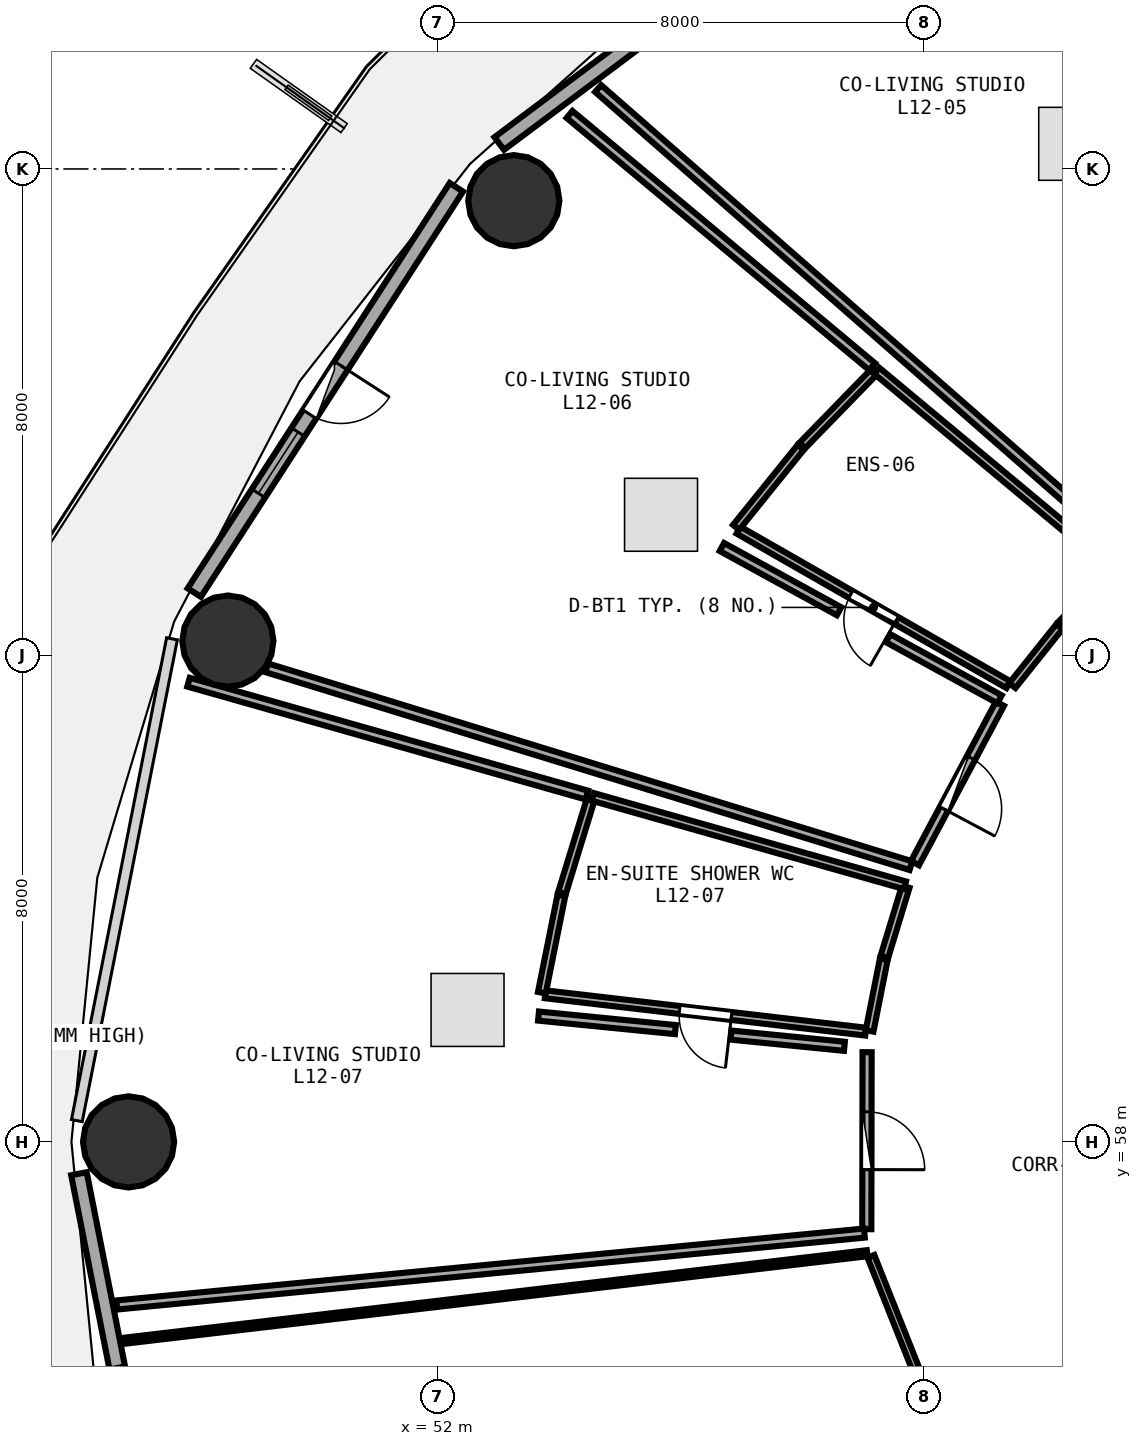
"""IFC4 building model, lengths in metres.
Left out: names, types, materials, properties, quantities, classifications, styles, units other than length and angle.
Written with IfcOpenShell. Run it as: python <this file> out.ifc"""

import sys

from ifc_helpers import new_model, si_unit, direction, frame, frame_2d, origin, origin_2d, place, context, subcontext, project, spatial, rectangle, circle, extrude, element, fill, save


model = new_model("IFC4")
c1 = context("Model", 3, precision=1e-05, world=origin(), true_north=direction((0.0, 1.0)))
c2 = subcontext(c1, "Body", "Model", "MODEL_VIEW")
j1 = project(units=[si_unit("LENGTHUNIT", "METRE"), si_unit("PLANEANGLEUNIT", "RADIAN")], contexts=[c1])
p1 = place(None, origin())
s1 = spatial("IfcSite", under=j1, at=p1, CompositionType="ELEMENT")
p2 = place(p1, origin())
s2 = spatial("IfcBuilding", under=s1, at=p2, CompositionType="ELEMENT")
p3 = place(p2, frame((0.0, 0.0, 48.75)))
s3 = spatial("IfcBuildingStorey", under=s2, at=p3, CompositionType="ELEMENT", Elevation=48.75)
for number, where, z_axis, x_axis in (
    (1, (53.256, 73.478, 0.0), (0.0, 0.0, 1.0), (1.0, 0.0, 0.0)),
    (2, (48.553, 66.236, 0.0), (0.0, 0.0, 1.0), (1.0, 0.0, 0.0)),
    (3, (46.92, 58.0, 0.0), (0.0, 0.0, 1.0), (1.0, 0.0, 0.0)),
):
    element("IfcColumn", number, at=place(p3, frame(where, z_axis=z_axis, x_axis=x_axis)), inside=s3, PredefinedType="COLUMN", context=c2, shape_type="SweptSolid", body=[
        extrude(circle(Radius=0.75, at=origin_2d()), origin(), (0.0, 0.0, 1.0), 3.75),
    ])
p4 = place(p3, frame((59.651, 79.389, 0.0), z_axis=(0.0, 0.0, 1.0), x_axis=(-0.80030733173, -0.599590005569, 0.0)))
e4 = element("IfcWall", 4, at=p4, inside=s3, PredefinedType="SOLIDWALL", context=c2, shape_type="SweptSolid", body=[
    extrude(rectangle(XDim=8.291, YDim=0.26, at=frame_2d((4.145, 0.0))), origin(), (0.0, 0.0, 1.0), 3.475),
])
p5 = place(p4, frame((3.345, 0.0, 0.85)))
e5 = element("IfcOpeningElement", 5, at=p5, cuts=e4, PredefinedType="OPENING", context=c2, shape_type="SweptSolid", body=[
    extrude(rectangle(XDim=1.6, YDim=1.45, at=frame_2d((0.8, 0.725))), frame((0.0, 0.14, 0.0), z_axis=(0.0, -1.0, 0.0), x_axis=(1.0, 0.0, 0.0)), (0.0, 0.0, 1.0), 0.28),
])
p6 = place(p3, frame((52.311, 73.698, 0.0), z_axis=(0.0, 0.0, 1.0), x_axis=(-0.543005114258, -0.839729388488, 0.0)))
e6 = element("IfcWall", 6, at=p6, inside=s3, PredefinedType="SOLIDWALL", context=c2, shape_type="SweptSolid", body=[
    extrude(rectangle(XDim=7.938, YDim=0.26, at=frame_2d((3.969, 0.0))), origin(), (0.0, 0.0, 1.0), 3.475),
])
p7 = place(p6, frame((3.494, 0.0, 0.0)))
e7 = element("IfcOpeningElement", 7, at=p7, cuts=e6, PredefinedType="OPENING", context=c2, shape_type="SweptSolid", body=[
    extrude(rectangle(XDim=0.95, YDim=2.1, at=frame_2d((0.475, 1.05))), frame((0.0, 0.14, 0.0), z_axis=(0.0, -1.0, 0.0), x_axis=(1.0, 0.0, 0.0)), (0.0, 0.0, 1.0), 0.28),
])
p8 = place(p6, frame((4.794, 0.0, 0.85)))
e8 = element("IfcOpeningElement", 8, at=p8, cuts=e6, PredefinedType="OPENING", context=c2, shape_type="SweptSolid", body=[
    extrude(rectangle(XDim=1.2, YDim=1.45, at=frame_2d((0.6, 0.725))), frame((0.0, 0.14, 0.0), z_axis=(0.0, -1.0, 0.0), x_axis=(1.0, 0.0, 0.0)), (0.0, 0.0, 1.0), 0.28),
])
p9 = place(p3, frame((46.104, 57.477, 0.0), z_axis=(0.0, 0.0, 1.0), x_axis=(0.193726159581, -0.98105564322, 0.0)))
e9 = element("IfcWall", 9, at=p9, inside=s3, PredefinedType="SOLIDWALL", context=c2, shape_type="SweptSolid", body=[
    extrude(rectangle(XDim=7.703, YDim=0.26, at=frame_2d((3.851, 0.0))), origin(), (0.0, 0.0, 1.0), 3.475),
])
p10 = place(p9, frame((3.231, 0.0, 0.85)))
e10 = element("IfcOpeningElement", 10, at=p10, cuts=e9, PredefinedType="OPENING", context=c2, shape_type="SweptSolid", body=[
    extrude(rectangle(XDim=1.6, YDim=1.45, at=frame_2d((0.8, 0.725))), frame((0.0, 0.14, 0.0), z_axis=(0.0, -1.0, 0.0), x_axis=(1.0, 0.0, 0.0)), (0.0, 0.0, 1.0), 0.28),
])
p11 = place(p3, frame((61.39, 65.519, 0.0), z_axis=(0.0, 0.0, 1.0), x_axis=(-0.867813964862, 0.496889245598, 0.0)))
e11 = element("IfcWall", 11, at=p11, inside=s3, PredefinedType="PLUMBINGWALL", context=c2, shape_type="SweptSolid", body=[
    extrude(rectangle(XDim=5.115, YDim=0.13, at=frame_2d((2.557, 0.0))), origin(), (0.0, 0.0, 1.0), 2.875),
])
p12 = place(p11, frame((2.127, 0.0, 0.0)))
e12 = element("IfcOpeningElement", 12, at=p12, cuts=e11, PredefinedType="OPENING", context=c2, shape_type="SweptSolid", body=[
    extrude(rectangle(XDim=0.86, YDim=2.05, at=frame_2d((0.43, 1.025))), frame((0.0, 0.075, 0.0), z_axis=(0.0, -1.0, 0.0), x_axis=(1.0, 0.0, 0.0)), (0.0, 0.0, 1.0), 0.15),
])
p13 = place(p3, frame((61.251, 65.206, 0.0), z_axis=(0.0, 0.0, 1.0), x_axis=(-0.470332327533, -0.882489377657, 0.0)))
e13 = element("IfcWall", 13, at=p13, inside=s3, PredefinedType="PARTITIONING", context=c2, shape_type="SweptSolid", body=[
    extrude(rectangle(XDim=2.971, YDim=0.15, at=frame_2d((1.486, 0.0))), origin(), (0.0, 0.0, 1.0), 2.875),
])
p14 = place(p13, frame((1.011, 0.0, 0.0)))
e14 = element("IfcOpeningElement", 14, at=p14, cuts=e13, PredefinedType="OPENING", context=c2, shape_type="SweptSolid", body=[
    extrude(rectangle(XDim=0.95, YDim=2.08, at=frame_2d((0.475, 1.04))), frame((0.0, 0.085, 0.0), z_axis=(0.0, -1.0, 0.0), x_axis=(1.0, 0.0, 0.0)), (0.0, 0.0, 1.0), 0.17),
])
p15 = place(p3, frame((59.043, 59.813, 0.0), z_axis=(0.0, 0.0, 1.0), x_axis=(-0.99328280677, 0.115711994952, 0.0)))
e15 = element("IfcWall", 15, at=p15, inside=s3, PredefinedType="PLUMBINGWALL", context=c2, shape_type="SweptSolid", body=[
    extrude(rectangle(XDim=5.306, YDim=0.13, at=frame_2d((2.653, 0.0))), origin(), (0.0, 0.0, 1.0), 3.175),
])
p16 = place(p15, frame((2.223, 0.0, 0.0)))
e16 = element("IfcOpeningElement", 16, at=p16, cuts=e15, PredefinedType="OPENING", context=c2, shape_type="SweptSolid", body=[
    extrude(rectangle(XDim=0.86, YDim=2.05, at=frame_2d((0.43, 1.025))), frame((0.0, 0.075, 0.0), z_axis=(0.0, -1.0, 0.0), x_axis=(1.0, 0.0, 0.0)), (0.0, 0.0, 1.0), 0.15),
])
p17 = place(p3, frame((59.066, 59.475, 0.0), z_axis=(0.0, 0.0, 1.0), x_axis=(-0.001677287141, -0.999998593353, 0.0)))
e17 = element("IfcWall", 17, at=p17, inside=s3, PredefinedType="PARTITIONING", context=c2, shape_type="SweptSolid", body=[
    extrude(rectangle(XDim=2.911, YDim=0.15, at=frame_2d((1.456, 0.0))), origin(), (0.0, 0.0, 1.0), 2.875),
])
p18 = place(p17, frame((0.981, 0.0, 0.0)))
e18 = element("IfcOpeningElement", 18, at=p18, cuts=e17, PredefinedType="OPENING", context=c2, shape_type="SweptSolid", body=[
    extrude(rectangle(XDim=0.95, YDim=2.08, at=frame_2d((0.475, 1.04))), frame((0.0, 0.085, 0.0), z_axis=(0.0, -1.0, 0.0), x_axis=(1.0, 0.0, 0.0)), (0.0, 0.0, 1.0), 0.17),
])
p19 = place(p3, frame((59.128, 56.118, 0.0), z_axis=(0.0, 0.0, 1.0), x_axis=(0.369903929858, -0.929070009566, 0.0)))
e19 = element("IfcWall", 19, at=p19, inside=s3, PredefinedType="PARTITIONING", context=c2, shape_type="SweptSolid", body=[
    extrude(rectangle(XDim=5.693, YDim=0.12, at=frame_2d((2.846, 0.0))), origin(), (0.0, 0.0, 1.0), 2.875),
])
p20 = place(p19, frame((2.396, 0.0, 0.0)))
e20 = element("IfcOpeningElement", 20, at=p20, cuts=e19, PredefinedType="OPENING", context=c2, shape_type="SweptSolid", body=[
    extrude(rectangle(XDim=0.9, YDim=2.08, at=frame_2d((0.45, 1.04))), frame((0.0, 0.07, 0.0), z_axis=(0.0, -1.0, 0.0), x_axis=(1.0, 0.0, 0.0)), (0.0, 0.0, 1.0), 0.14),
])
p21 = place(p3, frame((63.366, 67.685, 0.0), z_axis=(0.0, 0.0, 1.0), x_axis=(-0.752403187404, 0.658702849231, 0.0)))
e21 = element("IfcWall", 21, at=p21, inside=s3, PredefinedType="PARTITIONING", context=c2, shape_type="SweptSolid", body=[
    extrude(rectangle(XDim=11.595, YDim=0.15, at=frame_2d((5.797, 0.0))), origin(), (0.0, 0.0, 1.0), 2.875),
])
p22 = place(p3, frame((63.125, 67.408, 0.0), z_axis=(0.0, 0.0, 1.0), x_axis=(-0.693342211096, -0.720608477824, 0.0)))
e22 = element("IfcWall", 22, at=p22, inside=s3, PredefinedType="PLUMBINGWALL", context=c2, shape_type="SweptSolid", body=[
    extrude(rectangle(XDim=1.254, YDim=0.13, at=frame_2d((0.627, 0.0))), origin(), (0.0, 0.0, 1.0), 2.875),
])
p23 = place(p3, frame((62.229, 66.474, 0.0), z_axis=(0.0, 0.0, 1.0), x_axis=(-0.624263214868, -0.781214079854, 0.0)))
e23 = element("IfcWall", 23, at=p23, inside=s3, PredefinedType="PLUMBINGWALL", context=c2, shape_type="SweptSolid", body=[
    extrude(rectangle(XDim=1.241, YDim=0.13, at=frame_2d((0.621, 0.0))), origin(), (0.0, 0.0, 1.0), 2.875),
])
p24 = place(p3, frame((56.912, 68.106, 0.0), z_axis=(0.0, 0.0, 1.0), x_axis=(0.628152519701, 0.778090233837, 0.0)))
e24 = element("IfcWall", 24, at=p24, inside=s3, PredefinedType="PLUMBINGWALL", context=c2, shape_type="SweptSolid", body=[
    extrude(rectangle(XDim=1.693, YDim=0.13, at=frame_2d((0.847, 0.0))), origin(), (0.0, 0.0, 1.0), 3.175),
])
p25 = place(p3, frame((58.002, 69.453, 0.0), z_axis=(0.0, 0.0, 1.0), x_axis=(0.697337129747, 0.716743278641, 0.0)))
e25 = element("IfcWall", 25, at=p25, inside=s3, PredefinedType="PLUMBINGWALL", context=c2, shape_type="SweptSolid", body=[
    extrude(rectangle(XDim=1.711, YDim=0.13, at=frame_2d((0.855, 0.0))), origin(), (0.0, 0.0, 1.0), 2.875),
])
p26 = place(p3, frame((59.224, 70.681, 0.0), z_axis=(0.0, 0.0, 1.0), x_axis=(0.768509127281, -0.63983882446, 0.0)))
e26 = element("IfcWall", 26, at=p26, inside=s3, PredefinedType="PLUMBINGWALL", context=c2, shape_type="SweptSolid", body=[
    extrude(rectangle(XDim=5.074, YDim=0.13, at=frame_2d((2.537, 0.0))), origin(), (0.0, 0.0, 1.0), 3.175),
])
p27 = place(p3, frame((59.787, 62.543, 0.0), z_axis=(0.0, 0.0, 1.0), x_axis=(-0.955941269752, 0.29355798198, 0.0)))
e27 = element("IfcWall", 27, at=p27, inside=s3, PredefinedType="PARTITIONING", context=c2, shape_type="SweptSolid", body=[
    extrude(rectangle(XDim=11.083, YDim=0.15, at=frame_2d((5.542, 0.0))), origin(), (0.0, 0.0, 1.0), 3.175),
])
p28 = place(p3, frame((54.173, 74.896, 0.0), z_axis=(0.0, 0.0, 1.0), x_axis=(0.768100814479, -0.640328930157, 0.0)))
e28 = element("IfcWall", 28, at=p28, inside=s3, PredefinedType="PARTITIONING", context=c2, shape_type="SweptSolid", body=[
    extrude(rectangle(XDim=6.479, YDim=0.15, at=frame_2d((3.24, 0.0))), origin(), (0.0, 0.0, 1.0), 2.875),
])
p29 = place(p3, frame((56.678, 67.783, 0.0), z_axis=(0.0, 0.0, 1.0), x_axis=(0.876780673324, -0.480890477017, 0.0)))
e29 = element("IfcWall", 29, at=p29, inside=s3, PredefinedType="PARTITIONING", context=c2, shape_type="SweptSolid", body=[
    extrude(rectangle(XDim=2.197, YDim=0.15, at=frame_2d((1.099, 0.0))), origin(), (0.0, 0.0, 1.0), 3.175),
])
p30 = place(p3, frame((59.411, 66.283, 0.0), z_axis=(0.0, 0.0, 1.0), x_axis=(0.876772690424, -0.480905031505, 0.0)))
e30 = element("IfcWall", 30, at=p30, inside=s3, PredefinedType="PARTITIONING", context=c2, shape_type="SweptSolid", body=[
    extrude(rectangle(XDim=2.09, YDim=0.15, at=frame_2d((1.045, 0.0))), origin(), (0.0, 0.0, 1.0), 2.875),
])
p31 = place(p3, frame((59.701, 62.196, 0.0), z_axis=(0.0, 0.0, 1.0), x_axis=(-0.29128243511, -0.956637100993, 0.0)))
e31 = element("IfcWall", 31, at=p31, inside=s3, PredefinedType="PLUMBINGWALL", context=c2, shape_type="SweptSolid", body=[
    extrude(rectangle(XDim=1.206, YDim=0.13, at=frame_2d((0.603, 0.0))), origin(), (0.0, 0.0, 1.0), 3.48),
])
p32 = place(p3, frame((59.34, 61.003, 0.0), z_axis=(0.0, 0.0, 1.0), x_axis=(-0.194199574792, -0.980962040627, 0.0)))
e32 = element("IfcWall", 32, at=p32, inside=s3, PredefinedType="PLUMBINGWALL", context=c2, shape_type="SweptSolid", body=[
    extrude(rectangle(XDim=1.201, YDim=0.13, at=frame_2d((0.6, 0.0))), origin(), (0.0, 0.0, 1.0), 3.48),
])
p33 = place(p3, frame((53.717, 60.454, 0.0), z_axis=(0.0, 0.0, 1.0), x_axis=(0.196892919049, 0.98042499888, 0.0)))
e33 = element("IfcWall", 33, at=p33, inside=s3, PredefinedType="PLUMBINGWALL", context=c2, shape_type="SweptSolid", body=[
    extrude(rectangle(XDim=1.632, YDim=0.13, at=frame_2d((0.816, 0.0))), origin(), (0.0, 0.0, 1.0), 3.48),
])
p34 = place(p3, frame((54.048, 62.092, 0.0), z_axis=(0.0, 0.0, 1.0), x_axis=(0.293405839872, 0.955987977502, 0.0)))
e34 = element("IfcWall", 34, at=p34, inside=s3, PredefinedType="PLUMBINGWALL", context=c2, shape_type="SweptSolid", body=[
    extrude(rectangle(XDim=1.64, YDim=0.13, at=frame_2d((0.82, 0.0))), origin(), (0.0, 0.0, 1.0), 3.48),
])
p35 = place(p3, frame((54.554, 63.674, 0.0), z_axis=(0.0, 0.0, 1.0), x_axis=(0.962194506937, -0.272363233238, 0.0)))
e35 = element("IfcWall", 35, at=p35, inside=s3, PredefinedType="PLUMBINGWALL", context=c2, shape_type="SweptSolid", body=[
    extrude(rectangle(XDim=5.335, YDim=0.13, at=frame_2d((2.667, 0.0))), origin(), (0.0, 0.0, 1.0), 3.175),
])
p36 = place(p3, frame((59.021, 56.5, 0.0), z_axis=(0.0, 0.0, 1.0), x_axis=(-0.995408087514, -0.095722198638, 0.0)))
e36 = element("IfcWall", 36, at=p36, inside=s3, PredefinedType="PARTITIONING", context=c2, shape_type="SweptSolid", body=[
    extrude(rectangle(XDim=12.352, YDim=0.15, at=frame_2d((6.176, 0.0))), origin(), (0.0, 0.0, 1.0), 2.875),
])
p37 = place(p3, frame((47.906, 65.56, 0.0), z_axis=(0.0, 0.0, 1.0), x_axis=(0.962107451281, -0.272670592821, 0.0)))
e37 = element("IfcWall", 37, at=p37, inside=s3, PredefinedType="PARTITIONING", context=c2, shape_type="SweptSolid", body=[
    extrude(rectangle(XDim=6.811, YDim=0.15, at=frame_2d((3.406, 0.0))), origin(), (0.0, 0.0, 1.0), 2.875),
])
p38 = place(p3, frame((53.662, 60.069, 0.0), z_axis=(0.0, 0.0, 1.0), x_axis=(0.995156134458, -0.098307009162, 0.0)))
e38 = element("IfcWall", 38, at=p38, inside=s3, PredefinedType="PARTITIONING", context=c2, shape_type="SweptSolid", body=[
    extrude(rectangle(XDim=2.262, YDim=0.15, at=frame_2d((1.131, 0.0))), origin(), (0.0, 0.0, 1.0), 3.175),
])
p39 = place(p3, frame((56.829, 59.756, 0.0), z_axis=(0.0, 0.0, 1.0), x_axis=(0.995148801126, -0.098381215772, 0.0)))
e39 = element("IfcWall", 39, at=p39, inside=s3, PredefinedType="PARTITIONING", context=c2, shape_type="SweptSolid", body=[
    extrude(rectangle(XDim=1.874, YDim=0.15, at=frame_2d((0.937, 0.0))), origin(), (0.0, 0.0, 1.0), 3.48),
])
p40 = place(p3, frame((46.808, 54.725, 0.0), z_axis=(0.0, 0.0, 1.0), x_axis=(0.993128309916, 0.117030594475, 0.0)))
e40 = element("IfcWall", 40, at=p40, inside=s3, PredefinedType="PARTITIONING", context=c2, shape_type="SweptSolid", body=[
    extrude(rectangle(XDim=12.344, YDim=0.1, at=frame_2d((6.172, 0.0))), origin(), (0.0, 0.0, 1.0), 2.875),
])
p41 = place(p7, frame((0.95, 0.0, 0.0), z_axis=(0.0, 0.0, 1.0), x_axis=(-1.0, 0.0, 0.0)))
e41 = element("IfcDoor", 41, at=p41, inside=s3, OperationType="SINGLE_SWING_RIGHT", PredefinedType="DOOR", context=c2, shape_type="SweptSolid", body=[
    extrude(rectangle(XDim=0.95, YDim=2.1, at=frame_2d((0.475, 1.05))), frame((0.0, 0.025, 0.0), z_axis=(0.0, -1.0, 0.0), x_axis=(1.0, 0.0, 0.0)), (0.0, 0.0, 1.0), 0.05),
])
fill(e7, e41)
p42 = place(p8, origin())
e42 = element("IfcWindow", 42, at=p42, inside=s3, PartitioningType="SINGLE_PANEL", PredefinedType="WINDOW", context=c2, shape_type="SweptSolid", body=[
    extrude(rectangle(XDim=1.2, YDim=1.45, at=frame_2d((0.6, 0.725))), frame((0.0, 0.03, 0.0), z_axis=(0.0, -1.0, 0.0), x_axis=(1.0, 0.0, 0.0)), (0.0, 0.0, 1.0), 0.06),
])
fill(e8, e42)
p43 = place(p12, origin())
e43 = element("IfcDoor", 43, at=p43, inside=s3, OperationType="SINGLE_SWING_LEFT", PredefinedType="DOOR", context=c2, shape_type="SweptSolid", body=[
    extrude(rectangle(XDim=0.86, YDim=2.05, at=frame_2d((0.43, 1.025))), frame((0.0, 0.025, 0.0), z_axis=(0.0, -1.0, 0.0), x_axis=(1.0, 0.0, 0.0)), (0.0, 0.0, 1.0), 0.05),
])
fill(e12, e43)
p44 = place(p14, origin())
e44 = element("IfcDoor", 44, at=p44, inside=s3, OperationType="SINGLE_SWING_RIGHT", PredefinedType="DOOR", context=c2, shape_type="SweptSolid", body=[
    extrude(rectangle(XDim=0.95, YDim=2.08, at=frame_2d((0.475, 1.04))), frame((0.0, 0.025, 0.0), z_axis=(0.0, -1.0, 0.0), x_axis=(1.0, 0.0, 0.0)), (0.0, 0.0, 1.0), 0.05),
])
fill(e14, e44)
p45 = place(p16, origin())
e45 = element("IfcDoor", 45, at=p45, inside=s3, OperationType="SINGLE_SWING_LEFT", PredefinedType="DOOR", context=c2, shape_type="SweptSolid", body=[
    extrude(rectangle(XDim=0.86, YDim=2.05, at=frame_2d((0.43, 1.025))), frame((0.0, 0.025, 0.0), z_axis=(0.0, -1.0, 0.0), x_axis=(1.0, 0.0, 0.0)), (0.0, 0.0, 1.0), 0.05),
])
fill(e16, e45)
p46 = place(p18, origin())
e46 = element("IfcDoor", 46, at=p46, inside=s3, OperationType="SINGLE_SWING_RIGHT", PredefinedType="DOOR", context=c2, shape_type="SweptSolid", body=[
    extrude(rectangle(XDim=0.95, YDim=2.08, at=frame_2d((0.475, 1.04))), frame((0.0, 0.025, 0.0), z_axis=(0.0, -1.0, 0.0), x_axis=(1.0, 0.0, 0.0)), (0.0, 0.0, 1.0), 0.05),
])
fill(e18, e46)
save(model, sys.argv[1])
